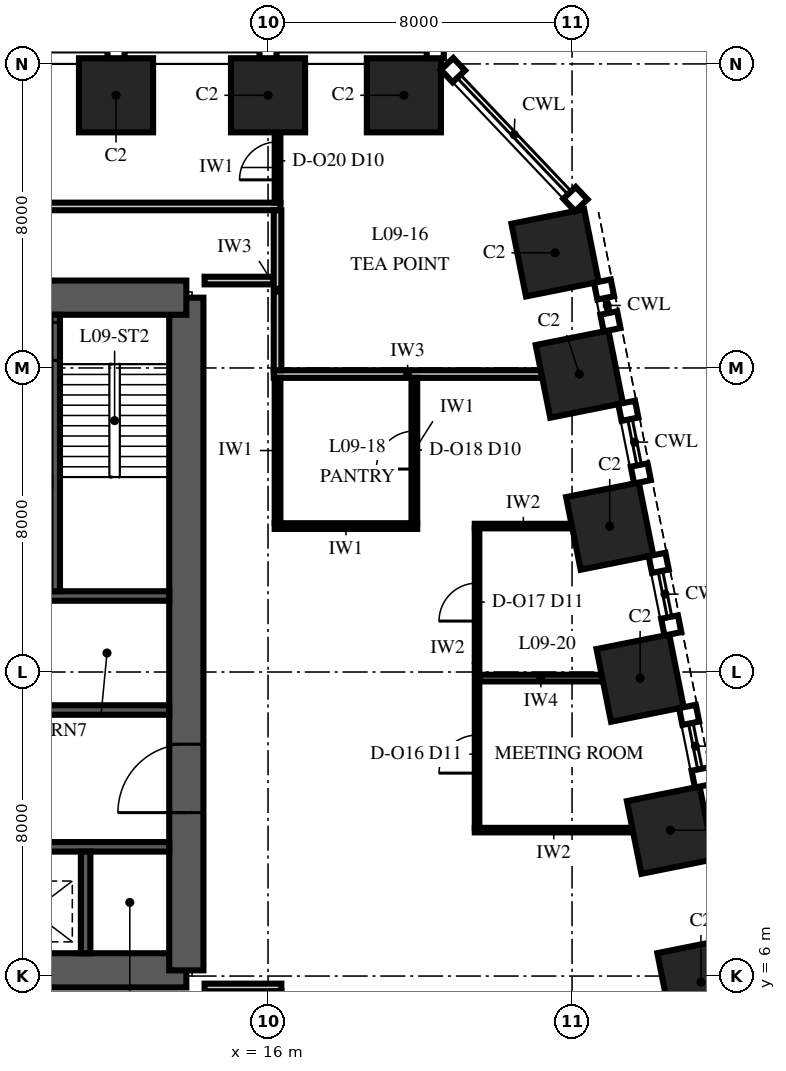
"""IFC4 building model, lengths in metres.
Left out: names, types, materials, properties, quantities, classifications, styles, units other than length and angle.
Written with IfcOpenShell. Run it as: python <this file> out.ifc"""

import sys

from ifc_helpers import new_model, si_unit, direction, frame, frame_2d, origin, origin_2d, place, context, subcontext, project, spatial, polyline, rectangle, outline, extrude, element, fill, save


model = new_model("IFC4")
c1 = context("Model", 3, precision=1e-05, world=origin(), true_north=direction((0.0, 1.0)))
c2 = subcontext(c1, "Body", "Model", "MODEL_VIEW")
j1 = project(units=[si_unit("LENGTHUNIT", "METRE"), si_unit("PLANEANGLEUNIT", "RADIAN")], contexts=[c1])
p1 = place(None, origin())
s1 = spatial("IfcSite", under=j1, at=p1, CompositionType="ELEMENT")
p2 = place(p1, origin())
s2 = spatial("IfcBuilding", under=s1, at=p2, CompositionType="ELEMENT")
p3 = place(p2, frame((0.0, 0.0, 48.0)))
s3 = spatial("IfcBuildingStorey", under=s2, at=p3, CompositionType="ELEMENT", Elevation=48.0)
for number, where, z_axis, x_axis in (
    (1, (27.391, 5.838, 0.0), (0.0, 0.0, 1.0), (-0.196, 0.981, 0.0)),
    (2, (26.591, 9.838, 0.0), (0.0, 0.0, 1.0), (-0.196, 0.981, 0.0)),
    (3, (25.791, 13.838, 0.0), (0.0, 0.0, 1.0), (-0.196, 0.981, 0.0)),
    (4, (24.991, 17.838, 0.0), (0.0, 0.0, 1.0), (-0.196, 0.981, 0.0)),
    (5, (24.191, 21.838, 0.0), (0.0, 0.0, 1.0), (-0.196, 0.981, 0.0)),
    (6, (23.553, 25.029, 0.0), (0.0, 0.0, 1.0), (-0.196, 0.981, 0.0)),
    (7, (19.575, 29.175, 0.0), (0.0, 0.0, 1.0), (-1.0, 0.0, 0.0)),
    (8, (16.0, 29.175, 0.0), (0.0, 0.0, 1.0), (-1.0, 0.0, 0.0)),
    (9, (12.0, 29.175, 0.0), (0.0, 0.0, 1.0), (-1.0, 0.0, 0.0)),
):
    element("IfcColumn", number, at=place(p3, frame(where, z_axis=z_axis, x_axis=x_axis)), inside=s3, PredefinedType="COLUMN", context=c2, shape_type="SweptSolid", body=[
        extrude(rectangle(XDim=1.95, YDim=1.95, at=origin_2d()), origin(), (0.0, 0.0, 1.0), 4.0),
    ])
p4 = place(p3, frame((-13.85, 6.15, 0.0), z_axis=(0.0, 0.0, 1.0), x_axis=(1.0, 0.0, 0.0)))
e10 = element("IfcWall", 10, at=p4, inside=s3, PredefinedType="SHEAR", context=c2, shape_type="SweptSolid", body=[
    extrude(rectangle(XDim=27.7, YDim=0.9, at=frame_2d((13.85, 0.0))), origin(), (0.0, 0.0, 1.0), 4.0),
])
p5 = place(p3, frame((13.85, 6.15, 0.0), z_axis=(0.0, 0.0, 1.0), x_axis=(0.0, 1.0, 0.0)))
e11 = element("IfcWall", 11, at=p5, inside=s3, PredefinedType="SHEAR", context=c2, shape_type="SweptSolid", body=[
    extrude(outline(polyline([(0.0, -0.45), (17.7, -0.45), (17.7, 0.0), (17.25, 0.0), (17.25, 0.45), (0.45, 0.45), (0.45, 0.0), (0.0, 0.0), (0.0, -0.45)])), origin(), (0.0, 0.0, 1.0), 4.0),
])
p6 = place(p5, frame((4.15, 0.0, 0.0)))
e12 = element("IfcOpeningElement", 12, at=p6, cuts=e11, PredefinedType="OPENING", context=c2, shape_type="SweptSolid", body=[
    extrude(rectangle(XDim=1.8, YDim=2.4, at=frame_2d((0.9, 1.2))), frame((0.0, 0.465, 0.0), z_axis=(0.0, -1.0, 0.0), x_axis=(1.0, 0.0, 0.0)), (0.0, 0.0, 1.0), 0.93),
])
p7 = place(p3, frame((13.85, 23.85, 0.0), z_axis=(0.0, 0.0, 1.0), x_axis=(-1.0, 0.0, 0.0)))
e13 = element("IfcWall", 13, at=p7, inside=s3, PredefinedType="SHEAR", context=c2, shape_type="SweptSolid", body=[
    extrude(rectangle(XDim=27.7, YDim=0.9, at=frame_2d((13.85, 0.0))), origin(), (0.0, 0.0, 1.0), 4.0),
])
p8 = place(p7, frame((21.75, 0.0, 0.0)))
e14 = element("IfcOpeningElement", 14, at=p8, cuts=e13, PredefinedType="OPENING", context=c2, shape_type="SweptSolid", body=[
    extrude(rectangle(XDim=1.0, YDim=2.1, at=frame_2d((0.5, 1.05))), frame((0.0, 0.465, 0.0), z_axis=(0.0, -1.0, 0.0), x_axis=(1.0, 0.0, 0.0)), (0.0, 0.0, 1.0), 0.93),
])
p9 = place(p7, frame((4.95, 0.0, 0.0)))
e15 = element("IfcOpeningElement", 15, at=p9, cuts=e13, PredefinedType="OPENING", context=c2, shape_type="SweptSolid", body=[
    extrude(rectangle(XDim=1.0, YDim=2.1, at=frame_2d((0.5, 1.05))), frame((0.0, 0.465, 0.0), z_axis=(0.0, -1.0, 0.0), x_axis=(1.0, 0.0, 0.0)), (0.0, 0.0, 1.0), 0.93),
])
p10 = place(p7, frame((17.35, 0.0, 0.0)))
e16 = element("IfcOpeningElement", 16, at=p10, cuts=e13, PredefinedType="OPENING", context=c2, shape_type="SweptSolid", body=[
    extrude(rectangle(XDim=1.0, YDim=2.1, at=frame_2d((0.5, 1.05))), frame((0.0, 0.465, 0.0), z_axis=(0.0, -1.0, 0.0), x_axis=(1.0, 0.0, 0.0)), (0.0, 0.0, 1.0), 0.93),
])
p11 = place(p7, frame((13.35, 0.0, 0.0)))
e17 = element("IfcOpeningElement", 17, at=p11, cuts=e13, PredefinedType="OPENING", context=c2, shape_type="SweptSolid", body=[
    extrude(rectangle(XDim=1.0, YDim=2.1, at=frame_2d((0.5, 1.05))), frame((0.0, 0.465, 0.0), z_axis=(0.0, -1.0, 0.0), x_axis=(1.0, 0.0, 0.0)), (0.0, 0.0, 1.0), 0.93),
])
p12 = place(p7, frame((9.35, 0.0, 0.0)))
e18 = element("IfcOpeningElement", 18, at=p12, cuts=e13, PredefinedType="OPENING", context=c2, shape_type="SweptSolid", body=[
    extrude(rectangle(XDim=1.0, YDim=2.1, at=frame_2d((0.5, 1.05))), frame((0.0, 0.465, 0.0), z_axis=(0.0, -1.0, 0.0), x_axis=(1.0, 0.0, 0.0)), (0.0, 0.0, 1.0), 0.93),
])
p13 = place(p3, frame((-13.4, 9.4, 0.0), z_axis=(0.0, 0.0, 1.0), x_axis=(1.0, 0.0, 0.0)))
e19 = element("IfcWall", 19, at=p13, inside=s3, PredefinedType="SHEAR", context=c2, shape_type="SweptSolid", body=[
    extrude(rectangle(XDim=26.8, YDim=0.25, at=frame_2d((13.4, 0.0))), origin(), (0.0, 0.0, 1.0), 4.0),
])
p14 = place(p13, frame((0.25, 0.0, 0.0)))
e20 = element("IfcOpeningElement", 20, at=p14, cuts=e19, PredefinedType="OPENING", context=c2, shape_type="SweptSolid", body=[
    extrude(rectangle(XDim=1.1, YDim=2.1, at=frame_2d((0.55, 1.05))), frame((0.0, 0.14, 0.0), z_axis=(0.0, -1.0, 0.0), x_axis=(1.0, 0.0, 0.0)), (0.0, 0.0, 1.0), 0.28),
])
p15 = place(p13, frame((3.05, 0.0, 0.0)))
e21 = element("IfcOpeningElement", 21, at=p15, cuts=e19, PredefinedType="OPENING", context=c2, shape_type="SweptSolid", body=[
    extrude(rectangle(XDim=1.1, YDim=2.1, at=frame_2d((0.55, 1.05))), frame((0.0, 0.14, 0.0), z_axis=(0.0, -1.0, 0.0), x_axis=(1.0, 0.0, 0.0)), (0.0, 0.0, 1.0), 0.28),
])
p16 = place(p13, frame((5.85, 0.0, 0.0)))
e22 = element("IfcOpeningElement", 22, at=p16, cuts=e19, PredefinedType="OPENING", context=c2, shape_type="SweptSolid", body=[
    extrude(rectangle(XDim=1.1, YDim=2.1, at=frame_2d((0.55, 1.05))), frame((0.0, 0.14, 0.0), z_axis=(0.0, -1.0, 0.0), x_axis=(1.0, 0.0, 0.0)), (0.0, 0.0, 1.0), 0.28),
])
p17 = place(p3, frame((-13.4, 13.0, 0.0), z_axis=(0.0, 0.0, 1.0), x_axis=(1.0, 0.0, 0.0)))
e23 = element("IfcWall", 23, at=p17, inside=s3, PredefinedType="SHEAR", context=c2, shape_type="SweptSolid", body=[
    extrude(rectangle(XDim=26.8, YDim=0.25, at=frame_2d((13.4, 0.0))), origin(), (0.0, 0.0, 1.0), 4.0),
])
p18 = place(p17, frame((0.25, 0.0, 0.0)))
e24 = element("IfcOpeningElement", 24, at=p18, cuts=e23, PredefinedType="OPENING", context=c2, shape_type="SweptSolid", body=[
    extrude(rectangle(XDim=1.1, YDim=2.1, at=frame_2d((0.55, 1.05))), frame((0.0, 0.14, 0.0), z_axis=(0.0, -1.0, 0.0), x_axis=(1.0, 0.0, 0.0)), (0.0, 0.0, 1.0), 0.28),
])
p19 = place(p17, frame((8.65, 0.0, 0.0)))
e25 = element("IfcOpeningElement", 25, at=p19, cuts=e23, PredefinedType="OPENING", context=c2, shape_type="SweptSolid", body=[
    extrude(rectangle(XDim=1.1, YDim=2.1, at=frame_2d((0.55, 1.05))), frame((0.0, 0.14, 0.0), z_axis=(0.0, -1.0, 0.0), x_axis=(1.0, 0.0, 0.0)), (0.0, 0.0, 1.0), 0.28),
])
p20 = place(p17, frame((12.05, 0.0, 0.0)))
e26 = element("IfcOpeningElement", 26, at=p20, cuts=e23, PredefinedType="OPENING", context=c2, shape_type="SweptSolid", body=[
    extrude(rectangle(XDim=1.1, YDim=2.1, at=frame_2d((0.55, 1.05))), frame((0.0, 0.14, 0.0), z_axis=(0.0, -1.0, 0.0), x_axis=(1.0, 0.0, 0.0)), (0.0, 0.0, 1.0), 0.28),
])
p21 = place(p17, frame((15.25, 0.0, 0.0)))
e27 = element("IfcOpeningElement", 27, at=p21, cuts=e23, PredefinedType="OPENING", context=c2, shape_type="SweptSolid", body=[
    extrude(rectangle(XDim=0.9, YDim=2.1, at=frame_2d((0.45, 1.05))), frame((0.0, 0.14, 0.0), z_axis=(0.0, -1.0, 0.0), x_axis=(1.0, 0.0, 0.0)), (0.0, 0.0, 1.0), 0.28),
])
p22 = place(p17, frame((17.65, 0.0, 0.0)))
e28 = element("IfcOpeningElement", 28, at=p22, cuts=e23, PredefinedType="OPENING", context=c2, shape_type="SweptSolid", body=[
    extrude(rectangle(XDim=0.9, YDim=2.1, at=frame_2d((0.45, 1.05))), frame((0.0, 0.14, 0.0), z_axis=(0.0, -1.0, 0.0), x_axis=(1.0, 0.0, 0.0)), (0.0, 0.0, 1.0), 0.28),
])
p23 = place(p3, frame((-13.4, 16.0, 0.0), z_axis=(0.0, 0.0, 1.0), x_axis=(1.0, 0.0, 0.0)))
e29 = element("IfcWall", 29, at=p23, inside=s3, PredefinedType="SHEAR", context=c2, shape_type="SweptSolid", body=[
    extrude(rectangle(XDim=26.8, YDim=0.25, at=frame_2d((13.4, 0.0))), origin(), (0.0, 0.0, 1.0), 4.0),
])
p24 = place(p3, frame((11.2, 6.6, 0.0), z_axis=(0.0, 0.0, 1.0), x_axis=(0.0, 1.0, 0.0)))
e30 = element("IfcWall", 30, at=p24, inside=s3, PredefinedType="SHEAR", context=c2, shape_type="SweptSolid", body=[
    extrude(rectangle(XDim=2.675, YDim=0.25, at=frame_2d((1.337, 0.0))), origin(), (0.0, 0.0, 1.0), 4.0),
])
p25 = place(p3, frame((10.4, 16.125, 0.0), z_axis=(0.0, 0.0, 1.0), x_axis=(0.0, 1.0, 0.0)))
e31 = element("IfcWall", 31, at=p25, inside=s3, PredefinedType="SHEAR", context=c2, shape_type="SweptSolid", body=[
    extrude(rectangle(XDim=7.275, YDim=0.25, at=frame_2d((3.637, 0.0))), origin(), (0.0, 0.0, 1.0), 4.0),
])
p26 = place(p25, frame((6.075, 0.0, 0.0)))
e32 = element("IfcOpeningElement", 32, at=p26, cuts=e31, PredefinedType="OPENING", context=c2, shape_type="SweptSolid", body=[
    extrude(rectangle(XDim=1.0, YDim=2.1, at=frame_2d((0.5, 1.05))), frame((0.0, 0.14, 0.0), z_axis=(0.0, -1.0, 0.0), x_axis=(1.0, 0.0, 0.0)), (0.0, 0.0, 1.0), 0.28),
])
p27 = place(p3, frame((14.33, 5.7, 0.0), z_axis=(0.0, 0.0, 1.0), x_axis=(1.0, 0.0, 0.0)))
e33 = element("IfcWall", 33, at=p27, inside=s3, PredefinedType="PARTITIONING", context=c2, shape_type="SweptSolid", body=[
    extrude(rectangle(XDim=2.02, YDim=0.2, at=frame_2d((1.01, 0.0))), origin(), (0.0, 0.0, 1.0), 3.85),
])
p28 = place(p3, frame((21.44, 9.84, 0.0), z_axis=(0.0, 0.0, 1.0), x_axis=(1.0, 0.0, 0.0)))
e34 = element("IfcWall", 34, at=p28, inside=s3, PredefinedType="PARTITIONING", context=c2, shape_type="SweptSolid", body=[
    extrude(rectangle(XDim=4.156, YDim=0.12, at=frame_2d((2.078, 0.0))), origin(), (0.0, 0.0, 1.0), 3.25),
])
p29 = place(p3, frame((21.56, 13.84, 0.0), z_axis=(0.0, 0.0, 1.0), x_axis=(1.0, 0.0, 0.0)))
e35 = element("IfcWall", 35, at=p29, inside=s3, PredefinedType="PARTITIONING", context=c2, shape_type="SweptSolid", body=[
    extrude(rectangle(XDim=3.236, YDim=0.175, at=frame_2d((1.618, 0.0))), origin(), (0.0, 0.0, 1.0), 3.25),
])
p30 = place(p3, frame((16.175, 17.84, 0.0), z_axis=(0.0, 0.0, 1.0), x_axis=(1.0, 0.0, 0.0)))
e36 = element("IfcWall", 36, at=p30, inside=s3, PredefinedType="PARTITIONING", context=c2, shape_type="SweptSolid", body=[
    extrude(rectangle(XDim=3.75, YDim=0.15, at=frame_2d((1.875, 0.0))), origin(), (0.0, 0.0, 1.0), 3.25),
])
p31 = place(p3, frame((21.44, 17.84, 0.0), z_axis=(0.0, 0.0, 1.0), x_axis=(1.0, 0.0, 0.0)))
e37 = element("IfcWall", 37, at=p31, inside=s3, PredefinedType="PARTITIONING", context=c2, shape_type="SweptSolid", body=[
    extrude(rectangle(XDim=2.556, YDim=0.12, at=frame_2d((1.278, 0.0))), origin(), (0.0, 0.0, 1.0), 3.25),
])
p32 = place(p3, frame((16.15, 21.84, 0.0), z_axis=(0.0, 0.0, 1.0), x_axis=(1.0, 0.0, 0.0)))
e38 = element("IfcWall", 38, at=p32, inside=s3, PredefinedType="PARTITIONING", context=c2, shape_type="SweptSolid", body=[
    extrude(rectangle(XDim=7.046, YDim=0.2, at=frame_2d((3.523, 0.0))), origin(), (0.0, 0.0, 1.0), 3.25),
])
p33 = place(p3, frame((14.33, 24.3, 0.0), z_axis=(0.0, 0.0, 1.0), x_axis=(1.0, 0.0, 0.0)))
e39 = element("IfcWall", 39, at=p33, inside=s3, PredefinedType="PARTITIONING", context=c2, shape_type="SweptSolid", body=[
    extrude(rectangle(XDim=1.82, YDim=0.2, at=frame_2d((0.91, 0.0))), origin(), (0.0, 0.0, 1.0), 3.4),
])
p34 = place(p3, frame((-16.31, 26.25, 0.0), z_axis=(0.0, 0.0, 1.0), x_axis=(1.0, 0.0, 0.0)))
e40 = element("IfcWall", 40, at=p34, inside=s3, PredefinedType="PARTITIONING", context=c2, shape_type="SweptSolid", body=[
    extrude(rectangle(XDim=32.635, YDim=0.2, at=frame_2d((16.317, 0.0))), origin(), (0.0, 0.0, 1.0), 3.4),
])
p35 = place(p34, frame((15.71, 0.0, 0.0)))
e41 = element("IfcOpeningElement", 41, at=p35, cuts=e40, PredefinedType="OPENING", context=c2, shape_type="SweptSolid", body=[
    extrude(rectangle(XDim=1.2, YDim=2.4, at=frame_2d((0.6, 1.2))), frame((0.0, 0.115, 0.0), z_axis=(0.0, -1.0, 0.0), x_axis=(1.0, 0.0, 0.0)), (0.0, 0.0, 1.0), 0.23),
])
p36 = place(p3, frame((16.25, 3.85, 0.0), z_axis=(0.0, 0.0, 1.0), x_axis=(0.0, 1.0, 0.0)))
e42 = element("IfcWall", 42, at=p36, inside=s3, PredefinedType="PARTITIONING", context=c2, shape_type="SweptSolid", body=[
    extrude(rectangle(XDim=1.75, YDim=0.2, at=frame_2d((0.875, 0.0))), origin(), (0.0, 0.0, 1.0), 3.85),
])
p37 = place(p36, frame((0.27, 0.0, 0.0)))
e43 = element("IfcOpeningElement", 43, at=p37, cuts=e42, PredefinedType="OPENING", context=c2, shape_type="SweptSolid", body=[
    extrude(rectangle(XDim=1.2, YDim=2.4, at=frame_2d((0.6, 1.2))), frame((0.0, 0.115, 0.0), z_axis=(0.0, -1.0, 0.0), x_axis=(1.0, 0.0, 0.0)), (0.0, 0.0, 1.0), 0.23),
])
p38 = place(p3, frame((16.25, 17.915, 0.0), z_axis=(0.0, 0.0, 1.0), x_axis=(0.0, 1.0, 0.0)))
e44 = element("IfcWall", 44, at=p38, inside=s3, PredefinedType="PARTITIONING", context=c2, shape_type="SweptSolid", body=[
    extrude(rectangle(XDim=3.825, YDim=0.15, at=frame_2d((1.913, 0.0))), origin(), (0.0, 0.0, 1.0), 3.25),
])
p39 = place(p3, frame((16.25, 21.94, 0.0), z_axis=(0.0, 0.0, 1.0), x_axis=(0.0, 1.0, 0.0)))
e45 = element("IfcWall", 45, at=p39, inside=s3, PredefinedType="PARTITIONING", context=c2, shape_type="SweptSolid", body=[
    extrude(rectangle(XDim=4.21, YDim=0.2, at=frame_2d((2.105, 0.0))), origin(), (0.0, 0.0, 1.0), 3.4),
])
p40 = place(p3, frame((16.25, 26.35, 0.0), z_axis=(0.0, 0.0, 1.0), x_axis=(0.0, 1.0, 0.0)))
e46 = element("IfcWall", 46, at=p40, inside=s3, PredefinedType="PARTITIONING", context=c2, shape_type="SweptSolid", body=[
    extrude(rectangle(XDim=1.85, YDim=0.15, at=frame_2d((0.925, 0.0))), origin(), (0.0, 0.0, 1.0), 3.85),
])
p41 = place(p40, frame((0.6, 0.0, 0.0)))
e47 = element("IfcOpeningElement", 47, at=p41, cuts=e46, PredefinedType="OPENING", context=c2, shape_type="SweptSolid", body=[
    extrude(rectangle(XDim=1.0, YDim=2.3, at=frame_2d((0.5, 1.15))), frame((0.0, 0.09, 0.0), z_axis=(0.0, -1.0, 0.0), x_axis=(1.0, 0.0, 0.0)), (0.0, 0.0, 1.0), 0.18),
])
p42 = place(p3, frame((19.85, 17.915, 0.0), z_axis=(0.0, 0.0, 1.0), x_axis=(0.0, 1.0, 0.0)))
e48 = element("IfcWall", 48, at=p42, inside=s3, PredefinedType="PARTITIONING", context=c2, shape_type="SweptSolid", body=[
    extrude(rectangle(XDim=3.825, YDim=0.15, at=frame_2d((1.913, 0.0))), origin(), (0.0, 0.0, 1.0), 3.25),
])
p43 = place(p42, frame((1.425, 0.0, 0.0)))
e49 = element("IfcOpeningElement", 49, at=p43, cuts=e48, PredefinedType="OPENING", context=c2, shape_type="SweptSolid", body=[
    extrude(rectangle(XDim=1.0, YDim=2.3, at=frame_2d((0.5, 1.15))), frame((0.0, 0.09, 0.0), z_axis=(0.0, -1.0, 0.0), x_axis=(1.0, 0.0, 0.0)), (0.0, 0.0, 1.0), 0.18),
])
p44 = place(p3, frame((21.5, 9.9, 0.0), z_axis=(0.0, 0.0, 1.0), x_axis=(0.0, 1.0, 0.0)))
e50 = element("IfcWall", 50, at=p44, inside=s3, PredefinedType="PARTITIONING", context=c2, shape_type="SweptSolid", body=[
    extrude(rectangle(XDim=7.88, YDim=0.12, at=frame_2d((3.94, 0.0))), origin(), (0.0, 0.0, 1.0), 3.25),
])
p45 = place(p44, frame((1.44, 0.0, 0.0)))
e51 = element("IfcOpeningElement", 51, at=p45, cuts=e50, PredefinedType="OPENING", context=c2, shape_type="SweptSolid", body=[
    extrude(rectangle(XDim=1.0, YDim=2.4, at=frame_2d((0.5, 1.2))), frame((0.0, 0.075, 0.0), z_axis=(0.0, -1.0, 0.0), x_axis=(1.0, 0.0, 0.0)), (0.0, 0.0, 1.0), 0.15),
])
p46 = place(p44, frame((5.44, 0.0, 0.0)))
e52 = element("IfcOpeningElement", 52, at=p46, cuts=e50, PredefinedType="OPENING", context=c2, shape_type="SweptSolid", body=[
    extrude(rectangle(XDim=1.0, YDim=2.4, at=frame_2d((0.5, 1.2))), frame((0.0, 0.075, 0.0), z_axis=(0.0, -1.0, 0.0), x_axis=(1.0, 0.0, 0.0)), (0.0, 0.0, 1.0), 0.15),
])
p47 = place(p6, origin())
e53 = element("IfcDoor", 53, at=p47, inside=s3, OperationType="DOUBLE_DOOR_SINGLE_SWING", PredefinedType="DOOR", context=c2, shape_type="SweptSolid", body=[
    extrude(rectangle(XDim=1.8, YDim=2.4, at=frame_2d((0.9, 1.2))), frame((0.0, 0.45, 0.0), z_axis=(0.0, -1.0, 0.0), x_axis=(1.0, 0.0, 0.0)), (0.0, 0.0, 1.0), 0.899),
])
fill(e12, e53)
p48 = place(p26, origin())
e54 = element("IfcDoor", 54, at=p48, inside=s3, OperationType="SINGLE_SWING_LEFT", PredefinedType="DOOR", context=c2, shape_type="SweptSolid", body=[
    extrude(rectangle(XDim=1.0, YDim=2.1, at=frame_2d((0.5, 1.05))), frame((0.0, 0.125, 0.0), z_axis=(0.0, -1.0, 0.0), x_axis=(1.0, 0.0, 0.0)), (0.0, 0.0, 1.0), 0.25),
])
fill(e32, e54)
p49 = place(p45, origin())
e55 = element("IfcDoor", 55, at=p49, inside=s3, OperationType="SINGLE_SWING_RIGHT", PredefinedType="DOOR", context=c2, shape_type="SweptSolid", body=[
    extrude(rectangle(XDim=1.0, YDim=2.4, at=frame_2d((0.5, 1.2))), frame((0.0, 0.06, 0.0), z_axis=(0.0, -1.0, 0.0), x_axis=(1.0, 0.0, 0.0)), (0.0, 0.0, 1.0), 0.12),
])
fill(e51, e55)
p50 = place(p46, origin())
e56 = element("IfcDoor", 56, at=p50, inside=s3, OperationType="SINGLE_SWING_RIGHT", PredefinedType="DOOR", context=c2, shape_type="SweptSolid", body=[
    extrude(rectangle(XDim=1.0, YDim=2.4, at=frame_2d((0.5, 1.2))), frame((0.0, 0.06, 0.0), z_axis=(0.0, -1.0, 0.0), x_axis=(1.0, 0.0, 0.0)), (0.0, 0.0, 1.0), 0.12),
])
fill(e52, e56)
p51 = place(p43, origin())
e57 = element("IfcDoor", 57, at=p51, inside=s3, OperationType="SINGLE_SWING_LEFT", PredefinedType="DOOR", context=c2, shape_type="SweptSolid", body=[
    extrude(rectangle(XDim=1.0, YDim=2.3, at=frame_2d((0.5, 1.15))), frame((0.0, 0.075, 0.0), z_axis=(0.0, -1.0, 0.0), x_axis=(1.0, 0.0, 0.0)), (0.0, 0.0, 1.0), 0.149),
])
fill(e49, e57)
p52 = place(p41, origin())
e58 = element("IfcDoor", 58, at=p52, inside=s3, OperationType="SINGLE_SWING_LEFT", PredefinedType="DOOR", context=c2, shape_type="SweptSolid", body=[
    extrude(rectangle(XDim=1.0, YDim=2.3, at=frame_2d((0.5, 1.15))), frame((0.0, 0.075, 0.0), z_axis=(0.0, -1.0, 0.0), x_axis=(1.0, 0.0, 0.0)), (0.0, 0.0, 1.0), 0.149),
])
fill(e47, e58)
save(model, sys.argv[1])
